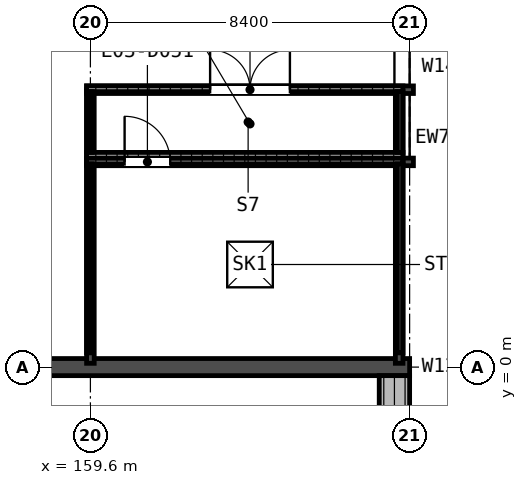
"""IFC4 building model, lengths in metres.
Left out: names, types, materials, properties, quantities, classifications, styles, units other than length and angle.
Written with IfcOpenShell. Run it as: python <this file> out.ifc"""

import sys

from ifc_helpers import new_model, si_unit, direction, frame, frame_2d, origin, origin_2d, place, context, subcontext, project, spatial, rectangle, extrude, element, fill, save


model = new_model("IFC4")
c1 = context("Model", 3, precision=1e-05, world=origin(), true_north=direction((0.0, 1.0)))
c2 = subcontext(c1, "Body", "Model", "MODEL_VIEW")
j1 = project(units=[si_unit("LENGTHUNIT", "METRE"), si_unit("PLANEANGLEUNIT", "RADIAN")], contexts=[c1])
p1 = place(None, origin())
s1 = spatial("IfcSite", under=j1, at=p1, CompositionType="ELEMENT")
p2 = place(p1, origin())
s2 = spatial("IfcBuilding", under=s1, at=p2, CompositionType="ELEMENT")
p3 = place(p2, frame((0.0, 0.0, 14.4)))
s3 = spatial("IfcBuildingStorey", under=s2, at=p3, CompositionType="ELEMENT", Elevation=14.4)
p4 = place(p3, frame((0.0, 0.0, -0.3), z_axis=(0.0, 0.0, 1.0), x_axis=(1.0, 0.0, 0.0)))
e1 = element("IfcWall", 1, at=p4, inside=s3, PredefinedType="SOLIDWALL", context=c2, shape_type="SweptSolid", body=[
    extrude(rectangle(XDim=168.0, YDim=0.45, at=frame_2d((84.0, 0.0))), origin(), (0.0, 0.0, 1.0), 3.3),
])
p5 = place(p3, frame((159.5, 5.4, -0.3), z_axis=(0.0, 0.0, 1.0), x_axis=(1.0, 0.0, 0.0)))
e2 = element("IfcWall", 2, at=p5, inside=s3, PredefinedType="SHEAR", context=c2, shape_type="SweptSolid", body=[
    extrude(rectangle(XDim=8.6, YDim=0.2, at=frame_2d((4.3, 0.0))), origin(), (0.0, 0.0, 1.0), 3.0),
])
p6 = place(p5, frame((1.0, 0.0, 0.3)))
e3 = element("IfcOpeningElement", 3, at=p6, cuts=e2, PredefinedType="OPENING", context=c2, shape_type="SweptSolid", body=[
    extrude(rectangle(XDim=1.2, YDim=2.2, at=frame_2d((0.6, 1.1))), frame((0.0, 0.11, 0.0), z_axis=(0.0, -1.0, 0.0), x_axis=(1.0, 0.0, 0.0)), (0.0, 0.0, 1.0), 0.22),
])
for number, where, z_axis, x_axis in (
    (4, (159.6, 0.1, -0.3), (0.0, 0.0, 1.0), (0.0, 1.0, 0.0)),
    (5, (167.725, 0.1, -0.3), (0.0, 0.0, 1.0), (0.0, 1.0, 0.0)),
):
    element("IfcWall", number, at=place(p3, frame(where, z_axis=z_axis, x_axis=x_axis)), inside=s3, PredefinedType="SHEAR", context=c2, shape_type="SweptSolid", body=[
        extrude(rectangle(XDim=5.2, YDim=0.2, at=frame_2d((2.6, 0.0))), origin(), (0.0, 0.0, 1.0), 3.0),
    ])
for number, where, z_axis, x_axis in (
    (6, (159.6, 5.4, -0.3), (0.0, 0.0, 1.0), (0.0, 1.0, 0.0)),
    (7, (167.725, 5.4, -0.3), (0.0, 0.0, 1.0), (0.0, 1.0, 0.0)),
):
    element("IfcWall", number, at=place(p3, frame(where, z_axis=z_axis, x_axis=x_axis)), inside=s3, PredefinedType="SHEAR", context=c2, shape_type="SweptSolid", body=[
        extrude(rectangle(XDim=1.9, YDim=0.2, at=frame_2d((0.95, 0.0))), origin(), (0.0, 0.0, 1.0), 3.0),
    ])
p7 = place(p3, frame((159.5, 7.3, -0.3), z_axis=(0.0, 0.0, 1.0), x_axis=(1.0, 0.0, 0.0)))
e8 = element("IfcWall", 8, at=p7, inside=s3, PredefinedType="SHEAR", context=c2, shape_type="SweptSolid", body=[
    extrude(rectangle(XDim=8.6, YDim=0.2, at=frame_2d((4.3, 0.0))), origin(), (0.0, 0.0, 1.0), 3.0),
])
p8 = place(p7, frame((3.25, 0.0, 0.3)))
e9 = element("IfcOpeningElement", 9, at=p8, cuts=e8, PredefinedType="OPENING", context=c2, shape_type="SweptSolid", body=[
    extrude(rectangle(XDim=2.1, YDim=2.2, at=frame_2d((1.05, 1.1))), frame((0.0, 0.11, 0.0), z_axis=(0.0, -1.0, 0.0), x_axis=(1.0, 0.0, 0.0)), (0.0, 0.0, 1.0), 0.22),
])
p9 = place(p3, frame((159.5, 5.425, 2.9), z_axis=(0.0, 0.0, 1.0), x_axis=(1.0, 0.0, 0.0)))
e10 = element("IfcWall", 10, at=p9, inside=s3, PredefinedType="PARAPET", context=c2, shape_type="SweptSolid", body=[
    extrude(rectangle(XDim=8.325, YDim=0.15, at=frame_2d((4.163, 0.0))), origin(), (0.0, 0.0, 1.0), 0.45),
])
for number, where, z_axis, x_axis in (
    (11, (159.575, 0.375, 2.9), (0.0, 0.0, 1.0), (0.0, 1.0, 0.0)),
    (12, (167.75, 0.375, 2.9), (0.0, 0.0, 1.0), (0.0, 1.0, 0.0)),
):
    element("IfcWall", number, at=place(p3, frame(where, z_axis=z_axis, x_axis=x_axis)), inside=s3, PredefinedType="PARAPET", context=c2, shape_type="SweptSolid", body=[
        extrude(rectangle(XDim=4.975, YDim=0.15, at=frame_2d((2.488, 0.0))), origin(), (0.0, 0.0, 1.0), 0.45),
    ])
for number, where, z_axis, x_axis in (
    (13, (159.5, 5.575, 2.9), (0.0, 0.0, 1.0), (1.0, 0.0, 0.0)),
    (14, (159.5, 7.325, 2.9), (0.0, 0.0, 1.0), (1.0, 0.0, 0.0)),
):
    element("IfcWall", number, at=place(p3, frame(where, z_axis=z_axis, x_axis=x_axis)), inside=s3, PredefinedType="PARAPET", context=c2, shape_type="SweptSolid", body=[
        extrude(rectangle(XDim=8.325, YDim=0.15, at=frame_2d((4.163, 0.0))), origin(), (0.0, 0.0, 1.0), 0.45),
    ])
for number, where, z_axis, x_axis in (
    (15, (159.575, 5.65, 2.9), (0.0, 0.0, 1.0), (0.0, 1.0, 0.0)),
    (16, (167.75, 5.65, 2.9), (0.0, 0.0, 1.0), (0.0, 1.0, 0.0)),
):
    element("IfcWall", number, at=place(p3, frame(where, z_axis=z_axis, x_axis=x_axis)), inside=s3, PredefinedType="PARAPET", context=c2, shape_type="SweptSolid", body=[
        extrude(rectangle(XDim=1.6, YDim=0.15, at=frame_2d((0.8, 0.0))), origin(), (0.0, 0.0, 1.0), 0.45),
    ])
p10 = place(p3, frame((167.6, -0.225, -0.3), z_axis=(0.0, 0.0, 1.0), x_axis=(0.0, -1.0, 0.0)))
e17 = element("IfcWall", 17, at=p10, inside=s3, PredefinedType="SOLIDWALL", context=c2, shape_type="SweptSolid", body=[
    extrude(rectangle(XDim=0.9, YDim=0.8, at=frame_2d((0.45, 0.0))), origin(), (0.0, 0.0, 1.0), 3.3),
])
p11 = place(p8, origin())
e18 = element("IfcDoor", 18, at=p11, inside=s3, OperationType="DOUBLE_DOOR_SINGLE_SWING", PredefinedType="DOOR", context=c2, shape_type="SweptSolid", body=[
    extrude(rectangle(XDim=2.1, YDim=0.013, at=frame_2d((1.05, 0.007))), frame((0.0, 0.088, 0.0), z_axis=(0.0, -1.0, 0.0), x_axis=(1.0, 0.0, 0.0)), (0.0, 0.0, 1.0), 0.176),
    extrude(rectangle(XDim=0.075, YDim=2.112, at=frame_2d((0.038, 1.069))), frame((0.0, 0.098, 0.0), z_axis=(0.0, -1.0, 0.0), x_axis=(1.0, 0.0, 0.0)), (0.0, 0.0, 1.0), 0.196),
    extrude(rectangle(XDim=0.075, YDim=2.112, at=frame_2d((2.062, 1.069))), frame((0.0, 0.098, 0.0), z_axis=(0.0, -1.0, 0.0), x_axis=(1.0, 0.0, 0.0)), (0.0, 0.0, 1.0), 0.196),
    extrude(rectangle(XDim=2.1, YDim=0.075, at=frame_2d((1.05, 2.163))), frame((0.0, 0.088, 0.0), z_axis=(0.0, -1.0, 0.0), x_axis=(1.0, 0.0, 0.0)), (0.0, 0.0, 1.0), 0.176),
    extrude(rectangle(XDim=1.95, YDim=2.112, at=frame_2d((1.05, 1.069))), frame((0.0, 0.025, 0.0), z_axis=(0.0, -1.0, 0.0), x_axis=(1.0, 0.0, 0.0)), (0.0, 0.0, 1.0), 0.05),
])
fill(e9, e18)
p12 = place(p6, origin())
e19 = element("IfcDoor", 19, at=p12, inside=s3, OperationType="SINGLE_SWING_RIGHT", PredefinedType="DOOR", context=c2, shape_type="SweptSolid", body=[
    extrude(rectangle(XDim=1.2, YDim=2.2, at=frame_2d((0.6, 1.1))), frame((0.0, 0.025, 0.0), z_axis=(0.0, -1.0, 0.0), x_axis=(1.0, 0.0, 0.0)), (0.0, 0.0, 1.0), 0.05),
])
fill(e3, e19)
p13 = place(p3, frame((0.0, 0.0, 2.7)))
p14 = place(p13, frame((163.8, 2.7, 0.0)))
p15 = place(p14, frame((0.0, 0.0, 0.15)))
e20 = element("IfcWindow", 20, at=p15, inside=s3, PartitioningType="SINGLE_PANEL", PredefinedType="SKYLIGHT", context=c2, shape_type="SweptSolid", body=[
    extrude(rectangle(XDim=1.2, YDim=1.2, at=origin_2d()), origin(), (0.0, 0.0, 1.0), 0.05),
])
save(model, sys.argv[1])
